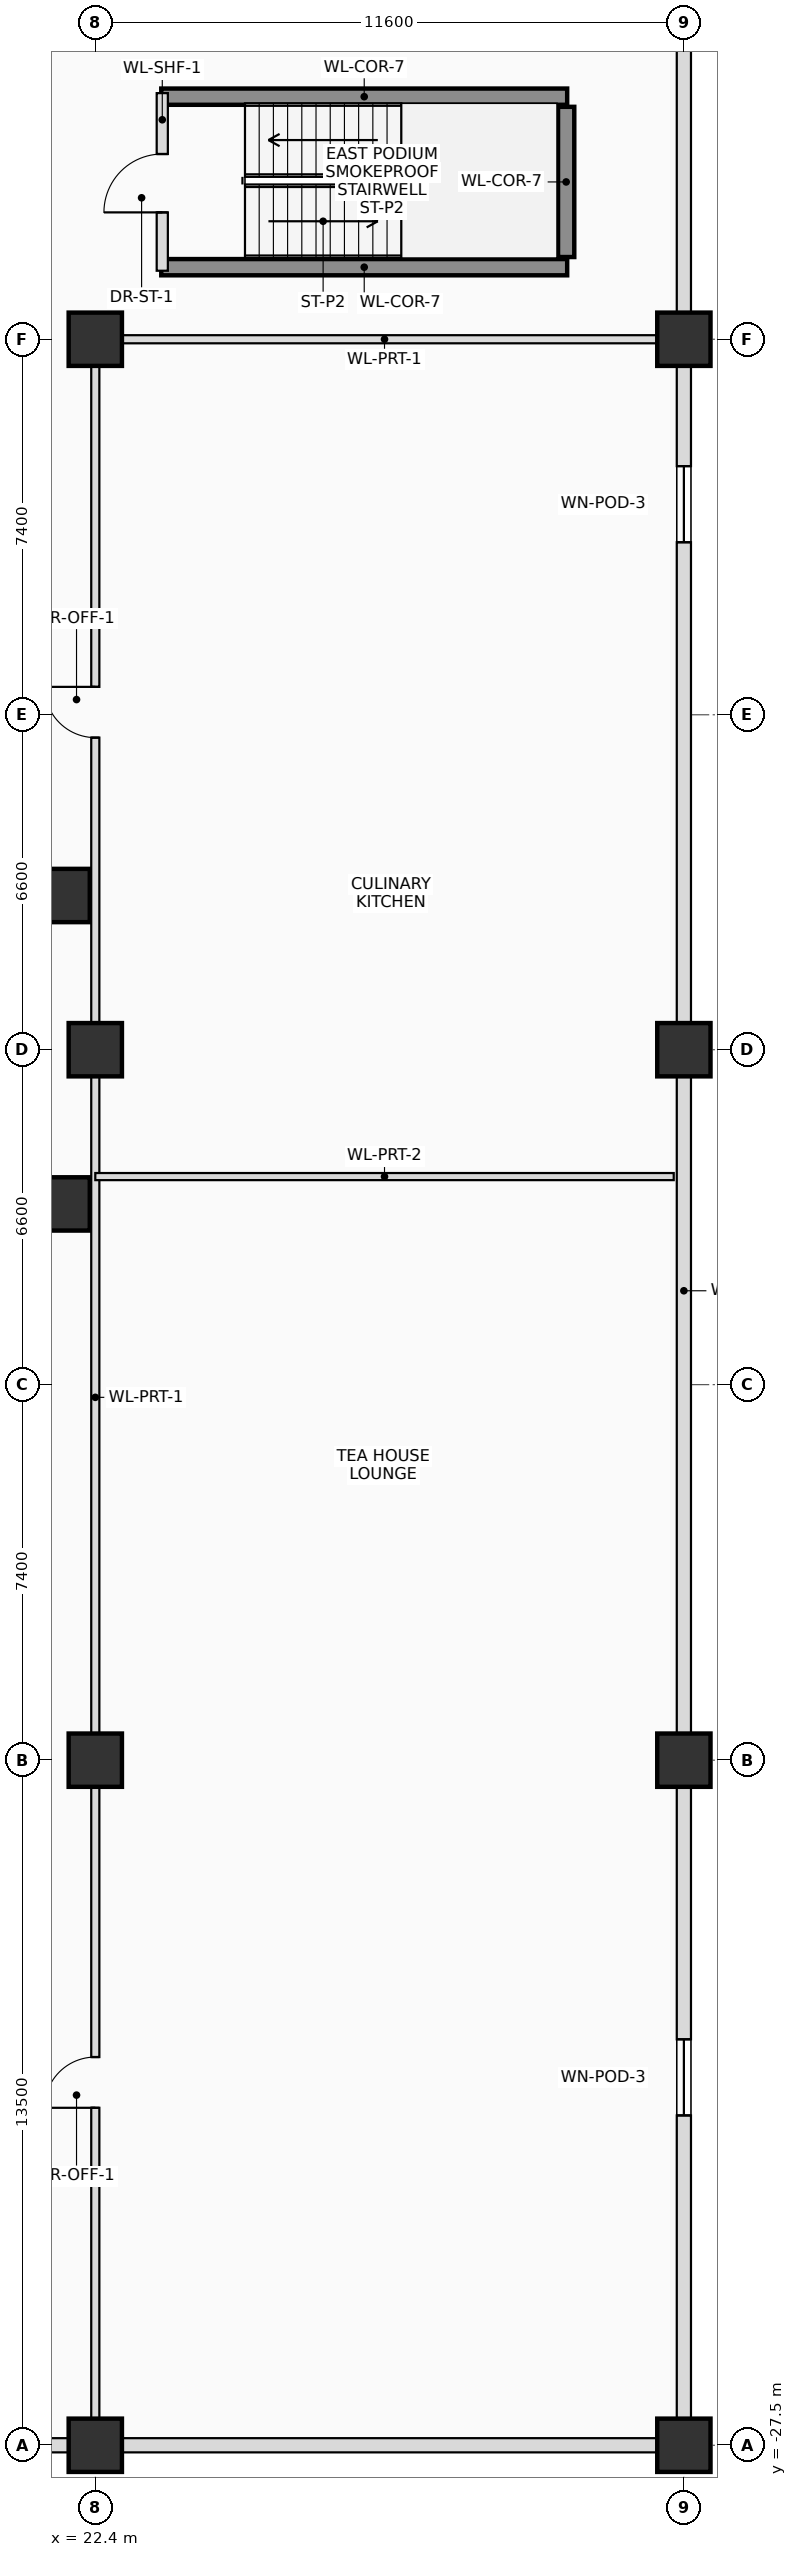
"""IFC4 building model, lengths in metres.
Left out: names, types, materials, properties, quantities, classifications, styles, units other than length and angle.
Written with IfcOpenShell. Run it as: python <this file> out.ifc"""

import sys

from ifc_helpers import new_model, si_unit, direction, frame, frame_2d, origin, origin_2d, place, context, subcontext, project, spatial, rectangle, extrude, source, transform, mapped, element, fill, save


model = new_model("IFC4")
c1 = context("Model", 3, precision=1e-05, world=origin(), true_north=direction((0.0, 1.0)))
c2 = subcontext(c1, "Body", "Model", "MODEL_VIEW")
j1 = project(units=[si_unit("LENGTHUNIT", "METRE"), si_unit("PLANEANGLEUNIT", "RADIAN")], contexts=[c1])
p1 = place(None, origin())
s1 = spatial("IfcSite", under=j1, at=p1, CompositionType="ELEMENT")
p2 = place(p1, origin())
s2 = spatial("IfcBuilding", under=s1, at=p2, CompositionType="ELEMENT")
p3 = place(p2, frame((0.0, 0.0, 16.2)))
s3 = spatial("IfcBuildingStorey", under=s2, at=p3, CompositionType="ELEMENT", Elevation=16.2)
for number, where, z_axis, x_axis in (
    (1, (23.7, 18.78, 0.0), (0.0, 0.0, 1.0), (1.0, 0.0, 0.0)),
    (2, (23.7, 15.42, 0.0), (0.0, 0.0, 1.0), (1.0, 0.0, 0.0)),
):
    element("IfcWall", number, at=place(p3, frame(where, z_axis=z_axis, x_axis=x_axis)), inside=s3, PredefinedType="SHEAR", context=c2, shape_type="SweptSolid", body=[
        extrude(rectangle(XDim=8.0, YDim=0.32, at=frame_2d((4.0, 0.0))), origin(), (0.0, 0.0, 1.0), 3.9),
    ])
p4 = place(p3, frame((31.68, 15.62, 0.0), z_axis=(0.0, 0.0, 1.0), x_axis=(0.0, 1.0, 0.0)))
e3 = element("IfcWall", 3, at=p4, inside=s3, PredefinedType="SHEAR", context=c2, shape_type="SweptSolid", body=[
    extrude(rectangle(XDim=2.96, YDim=0.32, at=frame_2d((1.48, 0.0))), origin(), (0.0, 0.0, 1.0), 3.9),
])
m1 = source(origin(), c2, "Body", "SweptSolid", [
    extrude(rectangle(XDim=1.05, YDim=1.05, at=origin_2d()), origin(), (0.0, 0.0, 1.0), 3.58),
])
for number, where, z_axis, x_axis in (
    (4, (22.4, -27.5, 0.0), (0.0, 0.0, 1.0), (1.0, 0.0, 0.0)),
    (5, (34.0, -27.5, 0.0), (0.0, 0.0, 1.0), (1.0, 0.0, 0.0)),
    (6, (22.4, -14.0, 0.0), (0.0, 0.0, 1.0), (1.0, 0.0, 0.0)),
    (7, (34.0, -14.0, 0.0), (0.0, 0.0, 1.0), (1.0, 0.0, 0.0)),
    (8, (22.4, 0.0, 0.0), (0.0, 0.0, 1.0), (1.0, 0.0, 0.0)),
    (9, (34.0, 0.0, 0.0), (0.0, 0.0, 1.0), (1.0, 0.0, 0.0)),
    (10, (22.4, 14.0, 0.0), (0.0, 0.0, 1.0), (1.0, 0.0, 0.0)),
    (11, (34.0, 14.0, 0.0), (0.0, 0.0, 1.0), (1.0, 0.0, 0.0)),
    (12, (21.766, -3.039, 0.0), (0.0, 0.0, 1.0), (1.0, 0.0, 0.0)),
    (13, (21.766, 3.039, 0.0), (0.0, 0.0, 1.0), (1.0, 0.0, 0.0)),
):
    element("IfcColumn", number, at=place(p3, frame(where, z_axis=z_axis, x_axis=x_axis)), inside=s3, PredefinedType="COLUMN", context=c2, shape_type="MappedRepresentation", body=[
        mapped(m1, transform((0.0, 0.0, 0.0), scale=1.0)),
    ])
p5 = place(p3, frame((34.0, 29.5, 0.0), z_axis=(0.0, 0.0, 1.0), x_axis=(0.0, -1.0, 0.0)))
e14 = element("IfcWall", 14, at=p5, inside=s3, PredefinedType="SOLIDWALL", context=c2, shape_type="SweptSolid", body=[
    extrude(rectangle(XDim=57.0, YDim=0.28, at=frame_2d((28.5, 0.0))), origin(), (0.0, 0.0, 1.0), 2.64),
])
p6 = place(p5, frame((18.0, 0.0, 0.65)))
e15 = element("IfcOpeningElement", 15, at=p6, cuts=e14, PredefinedType="OPENING", context=c2, shape_type="SweptSolid", body=[
    extrude(rectangle(XDim=1.5, YDim=1.8, at=frame_2d((0.75, 0.9))), frame((0.0, 0.15, 0.0), z_axis=(0.0, -1.0, 0.0), x_axis=(1.0, 0.0, 0.0)), (0.0, 0.0, 1.0), 0.3),
])
p7 = place(p5, frame((49.0, 0.0, 0.65)))
e16 = element("IfcOpeningElement", 16, at=p7, cuts=e14, PredefinedType="OPENING", context=c2, shape_type="SweptSolid", body=[
    extrude(rectangle(XDim=1.5, YDim=1.8, at=frame_2d((0.75, 0.9))), frame((0.0, 0.15, 0.0), z_axis=(0.0, -1.0, 0.0), x_axis=(1.0, 0.0, 0.0)), (0.0, 0.0, 1.0), 0.3),
])
p8 = place(p3, frame((34.0, -27.5, 0.0), z_axis=(0.0, 0.0, 1.0), x_axis=(-1.0, 0.0, 0.0)))
e17 = element("IfcWall", 17, at=p8, inside=s3, PredefinedType="SOLIDWALL", context=c2, shape_type="SweptSolid", body=[
    extrude(rectangle(XDim=68.0, YDim=0.28, at=frame_2d((34.0, 0.0))), origin(), (0.0, 0.0, 1.0), 2.64),
])
p9 = place(p8, frame((16.0, 0.0, 0.65)))
e18 = element("IfcOpeningElement", 18, at=p9, cuts=e17, PredefinedType="OPENING", context=c2, shape_type="SweptSolid", body=[
    extrude(rectangle(XDim=1.5, YDim=1.8, at=frame_2d((0.75, 0.9))), frame((0.0, 0.15, 0.0), z_axis=(0.0, -1.0, 0.0), x_axis=(1.0, 0.0, 0.0)), (0.0, 0.0, 1.0), 0.3),
])
p10 = place(p8, frame((49.0, 0.0, 0.65)))
e19 = element("IfcOpeningElement", 19, at=p10, cuts=e17, PredefinedType="OPENING", context=c2, shape_type="SweptSolid", body=[
    extrude(rectangle(XDim=1.5, YDim=1.8, at=frame_2d((0.75, 0.9))), frame((0.0, 0.15, 0.0), z_axis=(0.0, -1.0, 0.0), x_axis=(1.0, 0.0, 0.0)), (0.0, 0.0, 1.0), 0.3),
])
p11 = place(p3, frame((23.72, 15.35, 0.0), z_axis=(0.0, 0.0, 1.0), x_axis=(0.0, 1.0, 0.0)))
e20 = element("IfcWall", 20, at=p11, inside=s3, PredefinedType="PLUMBINGWALL", context=c2, shape_type="SweptSolid", body=[
    extrude(rectangle(XDim=3.5, YDim=0.22, at=frame_2d((1.75, 0.0))), origin(), (0.0, 0.0, 1.0), 3.56),
])
p12 = place(p11, frame((1.15, 0.0, 0.0)))
e21 = element("IfcOpeningElement", 21, at=p12, cuts=e20, PredefinedType="OPENING", context=c2, shape_type="SweptSolid", body=[
    extrude(rectangle(XDim=1.15, YDim=2.15, at=frame_2d((0.575, 1.075))), frame((0.0, 0.12, 0.0), z_axis=(0.0, -1.0, 0.0), x_axis=(1.0, 0.0, 0.0)), (0.0, 0.0, 1.0), 0.24),
])
p13 = place(p3, frame((22.4, -27.35, 0.0), z_axis=(0.0, 0.0, 1.0), x_axis=(0.0, 1.0, 0.0)))
e22 = element("IfcWall", 22, at=p13, inside=s3, PredefinedType="PARTITIONING", context=c2, shape_type="SweptSolid", body=[
    extrude(rectangle(XDim=41.35, YDim=0.16, at=frame_2d((20.675, 0.0))), origin(), (0.0, 0.0, 1.0), 3.56),
])
p14 = place(p13, frame((6.5, 0.0, 0.0)))
e23 = element("IfcOpeningElement", 23, at=p14, cuts=e22, PredefinedType="OPENING", context=c2, shape_type="SweptSolid", body=[
    extrude(rectangle(XDim=1.0, YDim=2.25, at=frame_2d((0.5, 1.125))), frame((0.0, 0.09, 0.0), z_axis=(0.0, -1.0, 0.0), x_axis=(1.0, 0.0, 0.0)), (0.0, 0.0, 1.0), 0.18),
])
p15 = place(p13, frame((33.5, 0.0, 0.0)))
e24 = element("IfcOpeningElement", 24, at=p15, cuts=e22, PredefinedType="OPENING", context=c2, shape_type="SweptSolid", body=[
    extrude(rectangle(XDim=1.0, YDim=2.25, at=frame_2d((0.5, 1.125))), frame((0.0, 0.09, 0.0), z_axis=(0.0, -1.0, 0.0), x_axis=(1.0, 0.0, 0.0)), (0.0, 0.0, 1.0), 0.18),
])
p16 = place(p3, frame((22.4, 14.0, 0.0), z_axis=(0.0, 0.0, 1.0), x_axis=(1.0, 0.0, 0.0)))
e25 = element("IfcWall", 25, at=p16, inside=s3, PredefinedType="PARTITIONING", context=c2, shape_type="SweptSolid", body=[
    extrude(rectangle(XDim=11.4, YDim=0.16, at=frame_2d((5.7, 0.0))), origin(), (0.0, 0.0, 1.0), 3.56),
])
p17 = place(p3, frame((22.4, -2.5, 0.0), z_axis=(0.0, 0.0, 1.0), x_axis=(1.0, 0.0, 0.0)))
e26 = element("IfcWall", 26, at=p17, inside=s3, PredefinedType="PARTITIONING", context=c2, shape_type="SweptSolid", body=[
    extrude(rectangle(XDim=11.4, YDim=0.14, at=frame_2d((5.7, 0.0))), origin(), (0.0, 0.0, 1.0), 3.56),
])
p18 = place(p6, origin())
e27 = element("IfcWindow", 27, at=p18, inside=s3, PartitioningType="SINGLE_PANEL", PredefinedType="WINDOW", context=c2, shape_type="SweptSolid", body=[
    extrude(rectangle(XDim=1.5, YDim=1.8, at=frame_2d((0.75, 0.9))), frame((0.0, 0.03, 0.0), z_axis=(0.0, -1.0, 0.0), x_axis=(1.0, 0.0, 0.0)), (0.0, 0.0, 1.0), 0.06),
])
fill(e15, e27)
p19 = place(p7, origin())
e28 = element("IfcWindow", 28, at=p19, inside=s3, PartitioningType="SINGLE_PANEL", PredefinedType="WINDOW", context=c2, shape_type="SweptSolid", body=[
    extrude(rectangle(XDim=1.5, YDim=1.8, at=frame_2d((0.75, 0.9))), frame((0.0, 0.03, 0.0), z_axis=(0.0, -1.0, 0.0), x_axis=(1.0, 0.0, 0.0)), (0.0, 0.0, 1.0), 0.06),
])
fill(e16, e28)
p20 = place(p12, origin())
e29 = element("IfcDoor", 29, at=p20, inside=s3, OperationType="SINGLE_SWING_LEFT", PredefinedType="DOOR", context=c2, shape_type="SweptSolid", body=[
    extrude(rectangle(XDim=1.15, YDim=2.15, at=frame_2d((0.575, 1.075))), frame((0.0, 0.025, 0.0), z_axis=(0.0, -1.0, 0.0), x_axis=(1.0, 0.0, 0.0)), (0.0, 0.0, 1.0), 0.05),
])
fill(e21, e29)
p21 = place(p14, origin())
e30 = element("IfcDoor", 30, at=p21, inside=s3, OperationType="SINGLE_SWING_LEFT", PredefinedType="DOOR", context=c2, shape_type="SweptSolid", body=[
    extrude(rectangle(XDim=1.0, YDim=2.25, at=frame_2d((0.5, 1.125))), frame((0.0, 0.025, 0.0), z_axis=(0.0, -1.0, 0.0), x_axis=(1.0, 0.0, 0.0)), (0.0, 0.0, 1.0), 0.05),
])
fill(e23, e30)
p22 = place(p15, origin())
e31 = element("IfcDoor", 31, at=p22, inside=s3, OperationType="SINGLE_SWING_RIGHT", PredefinedType="DOOR", context=c2, shape_type="SweptSolid", body=[
    extrude(rectangle(XDim=1.0, YDim=2.25, at=frame_2d((0.5, 1.125))), frame((0.0, 0.025, 0.0), z_axis=(0.0, -1.0, 0.0), x_axis=(1.0, 0.0, 0.0)), (0.0, 0.0, 1.0), 0.05),
])
fill(e24, e31)
save(model, sys.argv[1])
